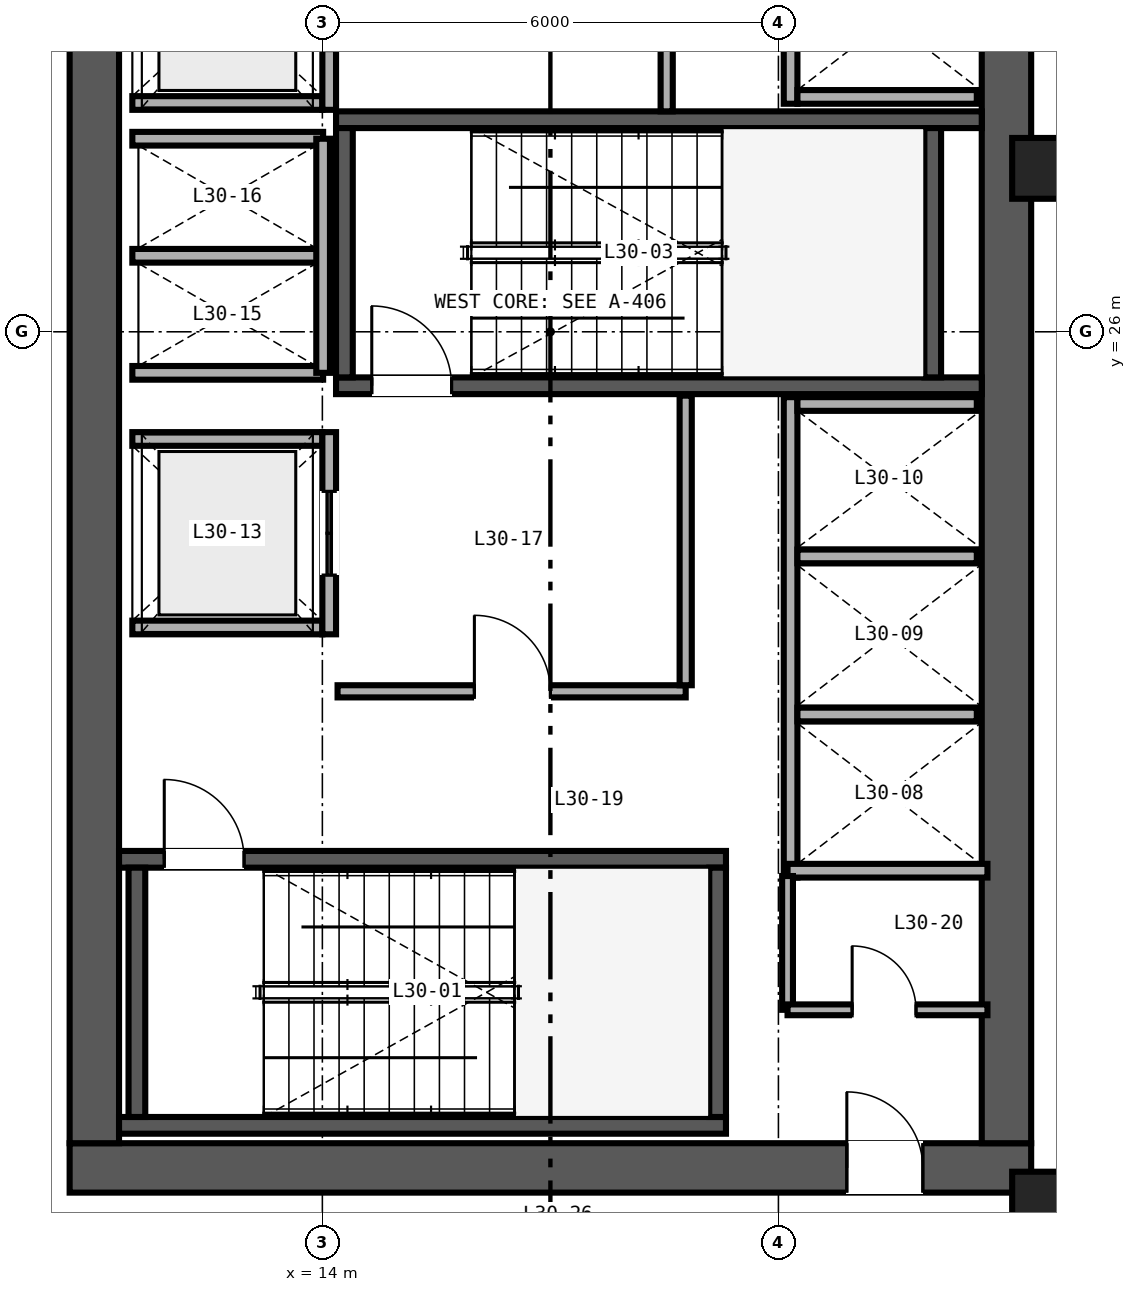
"""IFC4 building model, lengths in metres.
Left out: names, types, materials, properties, quantities, classifications, styles, units other than length and angle.
Written with IfcOpenShell. Run it as: python <this file> out.ifc"""

import sys

from ifc_helpers import new_model, si_unit, direction, frame, frame_2d, origin, origin_2d, place, context, subcontext, project, spatial, rectangle, hollow_rectangle, extrude, source, transform, mapped, element, fill, save


model = new_model("IFC4")
c1 = context("Model", 3, precision=1e-05, world=origin(), true_north=direction((0.0, 1.0)))
c2 = subcontext(c1, "Body", "Model", "MODEL_VIEW")
j1 = project(units=[si_unit("LENGTHUNIT", "METRE"), si_unit("PLANEANGLEUNIT", "RADIAN")], contexts=[c1])
p1 = place(None, origin())
s1 = spatial("IfcSite", under=j1, at=p1, CompositionType="ELEMENT")
p2 = place(p1, origin())
s2 = spatial("IfcBuilding", under=s1, at=p2, CompositionType="ELEMENT")
p3 = place(p2, frame((0.0, 0.0, 122.4)))
s3 = spatial("IfcBuildingStorey", under=s2, at=p3, CompositionType="ELEMENT", Elevation=122.4)
p4 = place(p3, frame((10.675, 15.0, 0.0), z_axis=(0.0, 0.0, 1.0), x_axis=(1.0, 0.0, 0.0)))
e1 = element("IfcWall", 1, at=p4, inside=s3, PredefinedType="SHEAR", context=c2, shape_type="SweptSolid", body=[
    extrude(rectangle(XDim=12.65, YDim=0.65, at=frame_2d((6.325, 0.0))), origin(), (0.0, 0.0, 1.0), 3.36),
])
p5 = place(p4, frame((10.225, 0.0, 0.0)))
e2 = element("IfcOpeningElement", 2, at=p5, cuts=e1, PredefinedType="OPENING", context=c2, shape_type="SweptSolid", body=[
    extrude(rectangle(XDim=1.0, YDim=2.15, at=frame_2d((0.5, 1.075))), frame((0.0, 0.335, 0.0), z_axis=(0.0, -1.0, 0.0), x_axis=(1.0, 0.0, 0.0)), (0.0, 0.0, 1.0), 0.67),
])
for number, where, z_axis, x_axis in (
    (3, (11.0, 15.325, 0.0), (0.0, 0.0, 1.0), (0.0, 1.0, 0.0)),
    (4, (23.0, 15.325, 0.0), (0.0, 0.0, 1.0), (0.0, 1.0, 0.0)),
):
    element("IfcWall", number, at=place(p3, frame(where, z_axis=z_axis, x_axis=x_axis)), inside=s3, PredefinedType="SHEAR", context=c2, shape_type="SweptSolid", body=[
        extrude(rectangle(XDim=21.35, YDim=0.65, at=frame_2d((10.675, 0.0))), origin(), (0.0, 0.0, 1.0), 3.36),
    ])
p6 = place(p3, frame((11.325, 15.56, 0.0), z_axis=(0.0, 0.0, 1.0), x_axis=(1.0, 0.0, 0.0)))
e5 = element("IfcWall", 5, at=p6, inside=s3, PredefinedType="SHEAR", context=c2, shape_type="SweptSolid", body=[
    extrude(rectangle(XDim=7.985, YDim=0.22, at=frame_2d((3.993, 0.0))), origin(), (0.0, 0.0, 1.0), 3.4),
])
p7 = place(p3, frame((11.325, 19.06, 0.0), z_axis=(0.0, 0.0, 1.0), x_axis=(1.0, 0.0, 0.0)))
e6 = element("IfcWall", 6, at=p7, inside=s3, PredefinedType="SHEAR", context=c2, shape_type="SweptSolid", body=[
    extrude(rectangle(XDim=7.985, YDim=0.22, at=frame_2d((3.993, 0.0))), origin(), (0.0, 0.0, 1.0), 3.4),
])
p8 = place(p7, frame((0.595, 0.0, 0.0)))
e7 = element("IfcOpeningElement", 7, at=p8, cuts=e6, PredefinedType="OPENING", context=c2, shape_type="SweptSolid", body=[
    extrude(rectangle(XDim=1.05, YDim=2.15, at=frame_2d((0.525, 1.075))), frame((0.0, 0.12, 0.0), z_axis=(0.0, -1.0, 0.0), x_axis=(1.0, 0.0, 0.0)), (0.0, 0.0, 1.0), 0.24),
])
for number, where, z_axis, x_axis in (
    (8, (11.56, 15.67, 0.0), (0.0, 0.0, 1.0), (0.0, 1.0, 0.0)),
    (9, (19.2, 15.67, 0.0), (0.0, 0.0, 1.0), (0.0, 1.0, 0.0)),
):
    element("IfcWall", number, at=place(p3, frame(where, z_axis=z_axis, x_axis=x_axis)), inside=s3, PredefinedType="SHEAR", context=c2, shape_type="SweptSolid", body=[
        extrude(rectangle(XDim=3.28, YDim=0.22, at=frame_2d((1.64, 0.0))), origin(), (0.0, 0.0, 1.0), 3.4),
    ])
p9 = place(p3, frame((14.18, 25.29, 0.0), z_axis=(0.0, 0.0, 1.0), x_axis=(1.0, 0.0, 0.0)))
e10 = element("IfcWall", 10, at=p9, inside=s3, PredefinedType="SHEAR", context=c2, shape_type="SweptSolid", body=[
    extrude(rectangle(XDim=8.495, YDim=0.22, at=frame_2d((4.248, 0.0))), origin(), (0.0, 0.0, 1.0), 3.4),
])
p10 = place(p9, frame((0.47, 0.0, 0.0)))
e11 = element("IfcOpeningElement", 11, at=p10, cuts=e10, PredefinedType="OPENING", context=c2, shape_type="SweptSolid", body=[
    extrude(rectangle(XDim=1.05, YDim=2.15, at=frame_2d((0.525, 1.075))), frame((0.0, 0.12, 0.0), z_axis=(0.0, -1.0, 0.0), x_axis=(1.0, 0.0, 0.0)), (0.0, 0.0, 1.0), 0.24),
])
p11 = place(p3, frame((14.18, 28.79, 0.0), z_axis=(0.0, 0.0, 1.0), x_axis=(1.0, 0.0, 0.0)))
e12 = element("IfcWall", 12, at=p11, inside=s3, PredefinedType="SHEAR", context=c2, shape_type="SweptSolid", body=[
    extrude(rectangle(XDim=8.495, YDim=0.22, at=frame_2d((4.248, 0.0))), origin(), (0.0, 0.0, 1.0), 3.4),
])
for number, where, z_axis, x_axis in (
    (13, (14.29, 25.4, 0.0), (0.0, 0.0, 1.0), (0.0, 1.0, 0.0)),
    (14, (22.03, 25.4, 0.0), (0.0, 0.0, 1.0), (0.0, 1.0, 0.0)),
):
    element("IfcWall", number, at=place(p3, frame(where, z_axis=z_axis, x_axis=x_axis)), inside=s3, PredefinedType="SHEAR", context=c2, shape_type="SweptSolid", body=[
        extrude(rectangle(XDim=3.28, YDim=0.22, at=frame_2d((1.64, 0.0))), origin(), (0.0, 0.0, 1.0), 3.4),
    ])
m1 = source(origin(), c2, "Body", "SweptSolid", [
    extrude(hollow_rectangle(XDim=0.85, YDim=0.8, WallThickness=0.032, at=origin_2d()), origin(), (0.0, 0.0, 1.0), 3.36),
])
for number, where, z_axis, x_axis in (
    (15, (23.5, 14.55, 0.0), (0.0, 0.0, 1.0), (1.0, 0.0, 0.0)),
    (16, (23.5, 28.15, 0.0), (0.0, 0.0, 1.0), (1.0, 0.0, 0.0)),
):
    element("IfcColumn", number, at=place(p3, frame(where, z_axis=z_axis, x_axis=x_axis)), inside=s3, PredefinedType="COLUMN", context=c2, shape_type="MappedRepresentation", body=[
        mapped(m1, transform((0.0, 0.0, 0.0), scale=1.0)),
    ])
p12 = place(p3, frame((20.16, 18.82, 0.0), z_axis=(0.0, 0.0, 1.0), x_axis=(0.0, 1.0, 0.0)))
e17 = element("IfcWall", 17, at=p12, inside=s3, PredefinedType="SOLIDWALL", context=c2, shape_type="SweptSolid", body=[
    extrude(rectangle(XDim=6.32, YDim=0.18, at=frame_2d((3.16, 0.0))), origin(), (0.0, 0.0, 1.0), 2.36),
])
p13 = place(p3, frame((20.12, 18.91, 0.0), z_axis=(0.0, 0.0, 1.0), x_axis=(1.0, 0.0, 0.0)))
e18 = element("IfcWall", 18, at=p13, inside=s3, PredefinedType="SOLIDWALL", context=c2, shape_type="SweptSolid", body=[
    extrude(rectangle(XDim=2.63, YDim=0.18, at=frame_2d((1.315, 0.0))), origin(), (0.0, 0.0, 1.0), 3.36),
])
p14 = place(p3, frame((20.25, 25.05, 0.0), z_axis=(0.0, 0.0, 1.0), x_axis=(1.0, 0.0, 0.0)))
e19 = element("IfcWall", 19, at=p14, inside=s3, PredefinedType="SOLIDWALL", context=c2, shape_type="SweptSolid", body=[
    extrude(rectangle(XDim=2.36, YDim=0.18, at=frame_2d((1.18, 0.0))), origin(), (0.0, 0.0, 1.0), 3.36),
])
p15 = place(p3, frame((20.25, 20.965, 0.0), z_axis=(0.0, 0.0, 1.0), x_axis=(1.0, 0.0, 0.0)))
e20 = element("IfcWall", 20, at=p15, inside=s3, PredefinedType="SOLIDWALL", context=c2, shape_type="SweptSolid", body=[
    extrude(rectangle(XDim=2.36, YDim=0.18, at=frame_2d((1.18, 0.0))), origin(), (0.0, 0.0, 1.0), 2.36),
])
p16 = place(p3, frame((20.25, 23.045, 0.0), z_axis=(0.0, 0.0, 1.0), x_axis=(1.0, 0.0, 0.0)))
e21 = element("IfcWall", 21, at=p16, inside=s3, PredefinedType="SOLIDWALL", context=c2, shape_type="SweptSolid", body=[
    extrude(rectangle(XDim=2.36, YDim=0.18, at=frame_2d((1.18, 0.0))), origin(), (0.0, 0.0, 1.0), 3.36),
])
p17 = place(p3, frame((20.16, 29.0, 0.0), z_axis=(0.0, 0.0, 1.0), x_axis=(0.0, 1.0, 0.0)))
e22 = element("IfcWall", 22, at=p17, inside=s3, PredefinedType="SOLIDWALL", context=c2, shape_type="SweptSolid", body=[
    extrude(rectangle(XDim=4.29, YDim=0.18, at=frame_2d((2.145, 0.0))), origin(), (0.0, 0.0, 1.0), 3.36),
])
p18 = place(p3, frame((20.25, 29.09, 0.0), z_axis=(0.0, 0.0, 1.0), x_axis=(1.0, 0.0, 0.0)))
e23 = element("IfcWall", 23, at=p18, inside=s3, PredefinedType="SOLIDWALL", context=c2, shape_type="SweptSolid", body=[
    extrude(rectangle(XDim=2.36, YDim=0.18, at=frame_2d((1.18, 0.0))), origin(), (0.0, 0.0, 1.0), 3.36),
])
for number, where, z_axis, x_axis in (
    (24, (11.5, 22.11, 0.0), (0.0, 0.0, 1.0), (1.0, 0.0, 0.0)),
    (25, (11.5, 24.59, 0.0), (0.0, 0.0, 1.0), (1.0, 0.0, 0.0)),
):
    element("IfcWall", number, at=place(p3, frame(where, z_axis=z_axis, x_axis=x_axis)), inside=s3, PredefinedType="SOLIDWALL", context=c2, shape_type="SweptSolid", body=[
        extrude(rectangle(XDim=2.5, YDim=0.18, at=frame_2d((1.25, 0.0))), origin(), (0.0, 0.0, 1.0), 3.36),
    ])
p19 = place(p3, frame((14.09, 22.02, 0.0), z_axis=(0.0, 0.0, 1.0), x_axis=(0.0, 1.0, 0.0)))
e26 = element("IfcWall", 26, at=p19, inside=s3, PredefinedType="SOLIDWALL", context=c2, shape_type="SweptSolid", body=[
    extrude(rectangle(XDim=2.66, YDim=0.18, at=frame_2d((1.33, 0.0))), origin(), (0.0, 0.0, 1.0), 3.36),
])
p20 = place(p19, frame((0.78, 0.0, 0.0)))
e27 = element("IfcOpeningElement", 27, at=p20, cuts=e26, PredefinedType="OPENING", context=c2, shape_type="SweptSolid", body=[
    extrude(rectangle(XDim=1.1, YDim=2.2, at=frame_2d((0.55, 1.1))), frame((0.0, 0.1, 0.0), z_axis=(0.0, -1.0, 0.0), x_axis=(1.0, 0.0, 0.0)), (0.0, 0.0, 1.0), 0.2),
])
p21 = place(p3, frame((11.5, 29.01, 0.0), z_axis=(0.0, 0.0, 1.0), x_axis=(1.0, 0.0, 0.0)))
e28 = element("IfcWall", 28, at=p21, inside=s3, PredefinedType="SOLIDWALL", context=c2, shape_type="SweptSolid", body=[
    extrude(rectangle(XDim=2.5, YDim=0.18, at=frame_2d((1.25, 0.0))), origin(), (0.0, 0.0, 1.0), 3.36),
])
p22 = place(p3, frame((14.09, 28.92, 0.0), z_axis=(0.0, 0.0, 1.0), x_axis=(0.0, 1.0, 0.0)))
e29 = element("IfcWall", 29, at=p22, inside=s3, PredefinedType="SOLIDWALL", context=c2, shape_type="SweptSolid", body=[
    extrude(rectangle(XDim=2.66, YDim=0.18, at=frame_2d((1.33, 0.0))), origin(), (0.0, 0.0, 1.0), 3.36),
])
p23 = place(p22, frame((0.78, 0.0, 0.0)))
e30 = element("IfcOpeningElement", 30, at=p23, cuts=e29, PredefinedType="OPENING", context=c2, shape_type="SweptSolid", body=[
    extrude(rectangle(XDim=1.1, YDim=2.2, at=frame_2d((0.55, 1.1))), frame((0.0, 0.1, 0.0), z_axis=(0.0, -1.0, 0.0), x_axis=(1.0, 0.0, 0.0)), (0.0, 0.0, 1.0), 0.2),
])
for number, where, z_axis, x_axis in (
    (31, (11.5, 25.46, 0.0), (0.0, 0.0, 1.0), (1.0, 0.0, 0.0)),
    (32, (11.5, 27.0, 0.0), (0.0, 0.0, 1.0), (1.0, 0.0, 0.0)),
    (33, (11.5, 28.54, 0.0), (0.0, 0.0, 1.0), (1.0, 0.0, 0.0)),
):
    element("IfcWall", number, at=place(p3, frame(where, z_axis=z_axis, x_axis=x_axis)), inside=s3, PredefinedType="SOLIDWALL", context=c2, shape_type="SweptSolid", body=[
        extrude(rectangle(XDim=2.51, YDim=0.18, at=frame_2d((1.255, 0.0))), origin(), (0.0, 0.0, 1.0), 3.36),
    ])
p24 = place(p3, frame((14.01, 25.46, 0.0), z_axis=(0.0, 0.0, 1.0), x_axis=(0.0, 1.0, 0.0)))
e34 = element("IfcWall", 34, at=p24, inside=s3, PredefinedType="SOLIDWALL", context=c2, shape_type="SweptSolid", body=[
    extrude(rectangle(XDim=3.08, YDim=0.18, at=frame_2d((1.54, 0.0))), origin(), (0.0, 0.0, 1.0), 3.36),
])
p25 = place(p3, frame((14.2, 21.27, 0.0), z_axis=(0.0, 0.0, 1.0), x_axis=(1.0, 0.0, 0.0)))
e35 = element("IfcWall", 35, at=p25, inside=s3, PredefinedType="PARTITIONING", context=c2, shape_type="SweptSolid", body=[
    extrude(rectangle(XDim=4.58, YDim=0.16, at=frame_2d((2.29, 0.0))), origin(), (0.0, 0.0, 1.0), 3.36),
])
p26 = place(p25, frame((1.8, 0.0, 0.0)))
e36 = element("IfcOpeningElement", 36, at=p26, cuts=e35, PredefinedType="OPENING", context=c2, shape_type="SweptSolid", body=[
    extrude(rectangle(XDim=1.0, YDim=2.15, at=frame_2d((0.5, 1.075))), frame((0.0, 0.09, 0.0), z_axis=(0.0, -1.0, 0.0), x_axis=(1.0, 0.0, 0.0)), (0.0, 0.0, 1.0), 0.18),
])
p27 = place(p3, frame((18.78, 21.35, 0.0), z_axis=(0.0, 0.0, 1.0), x_axis=(0.0, 1.0, 0.0)))
e37 = element("IfcWall", 37, at=p27, inside=s3, PredefinedType="PARTITIONING", context=c2, shape_type="SweptSolid", body=[
    extrude(rectangle(XDim=3.81, YDim=0.16, at=frame_2d((1.905, 0.0))), origin(), (0.0, 0.0, 1.0), 3.36),
])
p28 = place(p3, frame((18.53, 28.9, 0.0), z_axis=(0.0, 0.0, 1.0), x_axis=(0.0, 1.0, 0.0)))
e38 = element("IfcWall", 38, at=p28, inside=s3, PredefinedType="PARTITIONING", context=c2, shape_type="SweptSolid", body=[
    extrude(rectangle(XDim=3.9, YDim=0.16, at=frame_2d((1.95, 0.0))), origin(), (0.0, 0.0, 1.0), 3.36),
])
p29 = place(p28, frame((1.5, 0.0, 0.0)))
e39 = element("IfcOpeningElement", 39, at=p29, cuts=e38, PredefinedType="OPENING", context=c2, shape_type="SweptSolid", body=[
    extrude(rectangle(XDim=1.0, YDim=2.15, at=frame_2d((0.5, 1.075))), frame((0.0, 0.09, 0.0), z_axis=(0.0, -1.0, 0.0), x_axis=(1.0, 0.0, 0.0)), (0.0, 0.0, 1.0), 0.18),
])
p30 = place(p3, frame((20.12, 17.08, 0.0), z_axis=(0.0, 0.0, 1.0), x_axis=(0.0, 1.0, 0.0)))
e40 = element("IfcWall", 40, at=p30, inside=s3, PredefinedType="PARTITIONING", context=c2, shape_type="SweptSolid", body=[
    extrude(rectangle(XDim=1.76, YDim=0.142, at=frame_2d((0.88, 0.0))), origin(), (0.0, 0.0, 1.0), 3.36),
])
p31 = place(p3, frame((20.12, 17.08, 0.0), z_axis=(0.0, 0.0, 1.0), x_axis=(1.0, 0.0, 0.0)))
e41 = element("IfcWall", 41, at=p31, inside=s3, PredefinedType="PARTITIONING", context=c2, shape_type="SweptSolid", body=[
    extrude(rectangle(XDim=2.63, YDim=0.142, at=frame_2d((1.315, 0.0))), origin(), (0.0, 0.0, 1.0), 3.36),
])
p32 = place(p31, frame((0.85, 0.0, 0.0)))
e42 = element("IfcOpeningElement", 42, at=p32, cuts=e41, PredefinedType="OPENING", context=c2, shape_type="SweptSolid", body=[
    extrude(rectangle(XDim=0.84, YDim=2.1, at=frame_2d((0.42, 1.05))), frame((0.0, 0.081, 0.0), z_axis=(0.0, -1.0, 0.0), x_axis=(1.0, 0.0, 0.0)), (0.0, 0.0, 1.0), 0.162),
])
m2 = source(origin(), c2, "Body", "SweptSolid", [
    extrude(rectangle(XDim=1.05, YDim=2.15, at=frame_2d((0.525, 1.075))), frame((0.0, 0.025, 0.0), z_axis=(0.0, -1.0, 0.0), x_axis=(1.0, 0.0, 0.0)), (0.0, 0.0, 1.0), 0.05),
])
p33 = place(p8, origin())
e43 = element("IfcDoor", 43, at=p33, inside=s3, OperationType="SINGLE_SWING_LEFT", PredefinedType="DOOR", context=c2, shape_type="MappedRepresentation", body=[
    mapped(m2, transform((0.0, 0.0, 0.0), scale=1.0)),
])
fill(e7, e43)
p34 = place(p10, origin())
e44 = element("IfcDoor", 44, at=p34, inside=s3, OperationType="SINGLE_SWING_LEFT", PredefinedType="DOOR", context=c2, shape_type="MappedRepresentation", body=[
    mapped(m2, transform((0.0, 0.0, 0.0), scale=1.0)),
])
fill(e11, e44)
m3 = source(origin(), c2, "Body", "SweptSolid", [
    extrude(rectangle(XDim=1.1, YDim=2.2, at=frame_2d((0.55, 1.1))), frame((0.0, 0.025, 0.0), z_axis=(0.0, -1.0, 0.0), x_axis=(1.0, 0.0, 0.0)), (0.0, 0.0, 1.0), 0.05),
])
p35 = place(p20, origin())
e45 = element("IfcDoor", 45, at=p35, inside=s3, OperationType="DOUBLE_DOOR_SLIDING", PredefinedType="DOOR", context=c2, shape_type="MappedRepresentation", body=[
    mapped(m3, transform((0.0, 0.0, 0.0), scale=1.0)),
])
fill(e27, e45)
m4 = source(origin(), c2, "Body", "SweptSolid", [
    extrude(rectangle(XDim=1.0, YDim=2.15, at=frame_2d((0.5, 1.075))), frame((0.0, 0.025, 0.0), z_axis=(0.0, -1.0, 0.0), x_axis=(1.0, 0.0, 0.0)), (0.0, 0.0, 1.0), 0.05),
])
p36 = place(p26, origin())
e46 = element("IfcDoor", 46, at=p36, inside=s3, OperationType="SINGLE_SWING_LEFT", PredefinedType="DOOR", context=c2, shape_type="MappedRepresentation", body=[
    mapped(m4, transform((0.0, 0.0, 0.0), scale=1.0)),
])
fill(e36, e46)
m5 = source(origin(), c2, "Body", "SweptSolid", [
    extrude(rectangle(XDim=0.84, YDim=2.1, at=frame_2d((0.42, 1.05))), frame((0.0, 0.025, 0.0), z_axis=(0.0, -1.0, 0.0), x_axis=(1.0, 0.0, 0.0)), (0.0, 0.0, 1.0), 0.05),
])
p37 = place(p32, origin())
e47 = element("IfcDoor", 47, at=p37, inside=s3, OperationType="SINGLE_SWING_LEFT", PredefinedType="DOOR", context=c2, shape_type="MappedRepresentation", body=[
    mapped(m5, transform((0.0, 0.0, 0.0), scale=1.0)),
])
fill(e42, e47)
p38 = place(p5, origin())
e48 = element("IfcDoor", 48, at=p38, inside=s3, OperationType="SINGLE_SWING_LEFT", PredefinedType="DOOR", context=c2, shape_type="MappedRepresentation", body=[
    mapped(m4, transform((0.0, 0.0, 0.0), scale=1.0)),
])
fill(e2, e48)
save(model, sys.argv[1])
